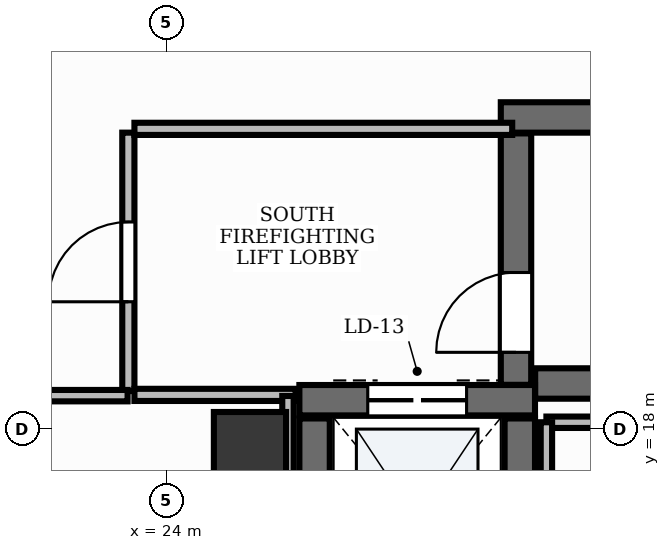
"""IFC4 building model, lengths in metres.
Left out: names, types, materials, properties, quantities, classifications, styles, units other than length and angle.
Written with IfcOpenShell. Run it as: python <this file> out.ifc"""

import sys

from ifc_helpers import new_model, si_unit, direction, frame, frame_2d, origin, origin_2d, place, context, subcontext, project, spatial, rectangle, extrude, element, fill, save


model = new_model("IFC4")
c1 = context("Model", 3, precision=1e-05, world=origin(), true_north=direction((0.0, 1.0)))
c2 = subcontext(c1, "Body", "Model", "MODEL_VIEW")
j1 = project(units=[si_unit("LENGTHUNIT", "METRE"), si_unit("PLANEANGLEUNIT", "RADIAN")], contexts=[c1])
p1 = place(None, origin())
s1 = spatial("IfcSite", under=j1, at=p1, CompositionType="ELEMENT")
p2 = place(p1, origin())
s2 = spatial("IfcBuilding", under=s1, at=p2, CompositionType="ELEMENT")
p3 = place(p2, frame((0.0, 0.0, 243.6)))
s3 = spatial("IfcBuildingStorey", under=s2, at=p3, CompositionType="ELEMENT", Elevation=243.6)
p4 = place(p3, frame((28.852, 18.6, 0.0), z_axis=(0.0, 0.0, 1.0), x_axis=(1.0, 0.0, 0.0)))
e1 = element("IfcWall", 1, at=p4, inside=s3, PredefinedType="SHEAR", context=c2, shape_type="SweptSolid", body=[
    extrude(rectangle(XDim=8.198, YDim=0.4, at=frame_2d((4.099, 0.0))), origin(), (0.0, 0.0, 1.0), 3.9),
])
p5 = place(p3, frame((28.4, 22.1, 0.0), z_axis=(0.0, 0.0, 1.0), x_axis=(1.0, 0.0, 0.0)))
e2 = element("IfcWall", 2, at=p5, inside=s3, PredefinedType="SHEAR", context=c2, shape_type="SweptSolid", body=[
    extrude(rectangle(XDim=8.65, YDim=0.4, at=frame_2d((4.325, 0.0))), origin(), (0.0, 0.0, 1.0), 3.9),
])
p6 = place(p3, frame((28.6, 18.582, 0.0), z_axis=(0.0, 0.0, 1.0), x_axis=(0.0, 1.0, 0.0)))
e3 = element("IfcWall", 3, at=p6, inside=s3, PredefinedType="SHEAR", context=c2, shape_type="SweptSolid", body=[
    extrude(rectangle(XDim=3.308, YDim=0.4, at=frame_2d((1.654, 0.0))), origin(), (0.0, 0.0, 1.0), 3.9),
])
p7 = place(p6, frame((0.428, 0.0, 0.0)))
e4 = element("IfcOpeningElement", 4, at=p7, cuts=e3, PredefinedType="OPENING", context=c2, shape_type="SweptSolid", body=[
    extrude(rectangle(XDim=1.05, YDim=2.15, at=frame_2d((0.525, 1.075))), frame((0.0, 0.215, 0.0), z_axis=(0.0, -1.0, 0.0), x_axis=(1.0, 0.0, 0.0)), (0.0, 0.0, 1.0), 0.43),
])
p8 = place(p3, frame((25.75, 18.38, 0.0), z_axis=(0.0, 0.0, 1.0), x_axis=(1.0, 0.0, 0.0)))
e5 = element("IfcWall", 5, at=p8, inside=s3, PredefinedType="SHEAR", context=c2, shape_type="SweptSolid", body=[
    extrude(rectangle(XDim=3.1, YDim=0.4, at=frame_2d((1.55, 0.0))), origin(), (0.0, 0.0, 1.0), 3.9),
])
p9 = place(p8, frame((0.9, 0.0, 0.0)))
e6 = element("IfcOpeningElement", 6, at=p9, cuts=e5, PredefinedType="OPENING", context=c2, shape_type="SweptSolid", body=[
    extrude(rectangle(XDim=1.3, YDim=2.2, at=frame_2d((0.65, 1.1))), frame((0.0, 0.215, 0.0), z_axis=(0.0, -1.0, 0.0), x_axis=(1.0, 0.0, 0.0)), (0.0, 0.0, 1.0), 0.43),
])
for number, where, z_axis, x_axis in (
    (7, (25.95, 15.44, 0.0), (0.0, 0.0, 1.0), (0.0, 1.0, 0.0)),
    (8, (28.65, 15.44, 0.0), (0.0, 0.0, 1.0), (0.0, 1.0, 0.0)),
):
    element("IfcWall", number, at=place(p3, frame(where, z_axis=z_axis, x_axis=x_axis)), inside=s3, PredefinedType="SHEAR", context=c2, shape_type="SweptSolid", body=[
        extrude(rectangle(XDim=2.7, YDim=0.4, at=frame_2d((1.35, 0.0))), origin(), (0.0, 0.0, 1.0), 3.9),
    ])
p10 = place(p3, frame((25.1, 17.75, -0.0), z_axis=(0.0, 0.0, 1.0), x_axis=(1.0, 0.0, 0.0)))
e9 = element("IfcColumn", 9, at=p10, inside=s3, PredefinedType="PILASTER", context=c2, shape_type="SweptSolid", body=[
    extrude(rectangle(XDim=0.95, YDim=0.95, at=origin_2d()), origin(), (0.0, 0.0, 1.0), 3.901),
])
p11 = place(p3, frame((23.5, 18.5, 0.0), z_axis=(0.0, 0.0, 1.0), x_axis=(0.0, 1.0, 0.0)))
e10 = element("IfcWall", 10, at=p11, inside=s3, PredefinedType="PARTITIONING", context=c2, shape_type="SweptSolid", body=[
    extrude(rectangle(XDim=3.4, YDim=0.16, at=frame_2d((1.7, 0.0))), origin(), (0.0, 0.0, 1.0), 2.91),
])
p12 = place(p11, frame((1.175, 0.0, 0.0)))
e11 = element("IfcOpeningElement", 11, at=p12, cuts=e10, PredefinedType="OPENING", context=c2, shape_type="SweptSolid", body=[
    extrude(rectangle(XDim=1.05, YDim=2.15, at=frame_2d((0.525, 1.075))), frame((0.0, 0.095, 0.0), z_axis=(0.0, -1.0, 0.0), x_axis=(1.0, 0.0, 0.0)), (0.0, 0.0, 1.0), 0.19),
])
p13 = place(p3, frame((23.58, 21.95, 0.0), z_axis=(0.0, 0.0, 1.0), x_axis=(1.0, 0.0, 0.0)))
e12 = element("IfcWall", 12, at=p13, inside=s3, PredefinedType="PARTITIONING", context=c2, shape_type="SweptSolid", body=[
    extrude(rectangle(XDim=4.97, YDim=0.16, at=frame_2d((2.485, 0.0))), origin(), (0.0, 0.0, 1.0), 2.91),
])
p14 = place(p3, frame((23.58, 18.45, 0.0), z_axis=(0.0, 0.0, 1.0), x_axis=(1.0, 0.0, 0.0)))
e13 = element("IfcWall", 13, at=p14, inside=s3, PredefinedType="PARTITIONING", context=c2, shape_type="SweptSolid", body=[
    extrude(rectangle(XDim=2.12, YDim=0.16, at=frame_2d((1.06, 0.0))), origin(), (0.0, 0.0, 1.0), 2.91),
])
p15 = place(p3, frame((21.8, 18.44, 0.0), z_axis=(0.0, 0.0, 1.0), x_axis=(1.0, 0.0, 0.0)))
e14 = element("IfcWall", 14, at=p15, inside=s3, PredefinedType="PARTITIONING", context=c2, shape_type="SweptSolid", body=[
    extrude(rectangle(XDim=1.69, YDim=0.15, at=frame_2d((0.845, 0.0))), origin(), (0.0, 0.0, 1.0), 2.91),
])
p16 = place(p3, frame((25.6, 18.436, 0.0), z_axis=(0.0, 0.0, 1.0), x_axis=(0.0, -1.0, 0.0)))
e15 = element("IfcWall", 15, at=p16, inside=s3, PredefinedType="PARTITIONING", context=c2, shape_type="SweptSolid", body=[
    extrude(rectangle(XDim=2.026, YDim=0.15, at=frame_2d((1.013, 0.0))), origin(), (0.0, 0.0, 1.0), 2.91),
])
p17 = place(p3, frame((29.0, 18.09, 0.0), z_axis=(0.0, 0.0, 1.0), x_axis=(1.0, 0.0, 0.0)))
e16 = element("IfcWall", 16, at=p17, inside=s3, PredefinedType="PARTITIONING", context=c2, shape_type="SweptSolid", body=[
    extrude(rectangle(XDim=8.35, YDim=0.15, at=frame_2d((4.175, 0.0))), origin(), (0.0, 0.0, 1.0), 2.91),
])
p18 = place(p3, frame((29.0, 16.41, 0.0), z_axis=(0.0, 0.0, 1.0), x_axis=(0.0, 1.0, 0.0)))
e17 = element("IfcWall", 17, at=p18, inside=s3, PredefinedType="PARTITIONING", context=c2, shape_type="SweptSolid", body=[
    extrude(rectangle(XDim=1.68, YDim=0.15, at=frame_2d((0.84, 0.0))), origin(), (0.0, 0.0, 1.0), 2.91),
])
p19 = place(p7, origin())
e18 = element("IfcDoor", 18, at=p19, inside=s3, OperationType="SINGLE_SWING_LEFT", PredefinedType="DOOR", context=c2, shape_type="SweptSolid", body=[
    extrude(rectangle(XDim=1.05, YDim=2.15, at=frame_2d((0.525, 1.075))), frame((0.0, 0.025, 0.0), z_axis=(0.0, -1.0, 0.0), x_axis=(1.0, 0.0, 0.0)), (0.0, 0.0, 1.0), 0.05),
])
fill(e4, e18)
p20 = place(p9, origin())
e19 = element("IfcDoor", 19, at=p20, inside=s3, OperationType="DOUBLE_DOOR_SLIDING", PredefinedType="DOOR", context=c2, shape_type="SweptSolid", body=[
    extrude(rectangle(XDim=1.3, YDim=2.2, at=frame_2d((0.65, 1.1))), frame((0.0, 0.025, 0.0), z_axis=(0.0, -1.0, 0.0), x_axis=(1.0, 0.0, 0.0)), (0.0, 0.0, 1.0), 0.05),
])
fill(e6, e19)
p21 = place(p12, origin())
e20 = element("IfcDoor", 20, at=p21, inside=s3, OperationType="SINGLE_SWING_LEFT", PredefinedType="DOOR", context=c2, shape_type="SweptSolid", body=[
    extrude(rectangle(XDim=1.05, YDim=2.15, at=frame_2d((0.525, 1.075))), frame((0.0, 0.025, 0.0), z_axis=(0.0, -1.0, 0.0), x_axis=(1.0, 0.0, 0.0)), (0.0, 0.0, 1.0), 0.05),
])
fill(e11, e20)
save(model, sys.argv[1])
